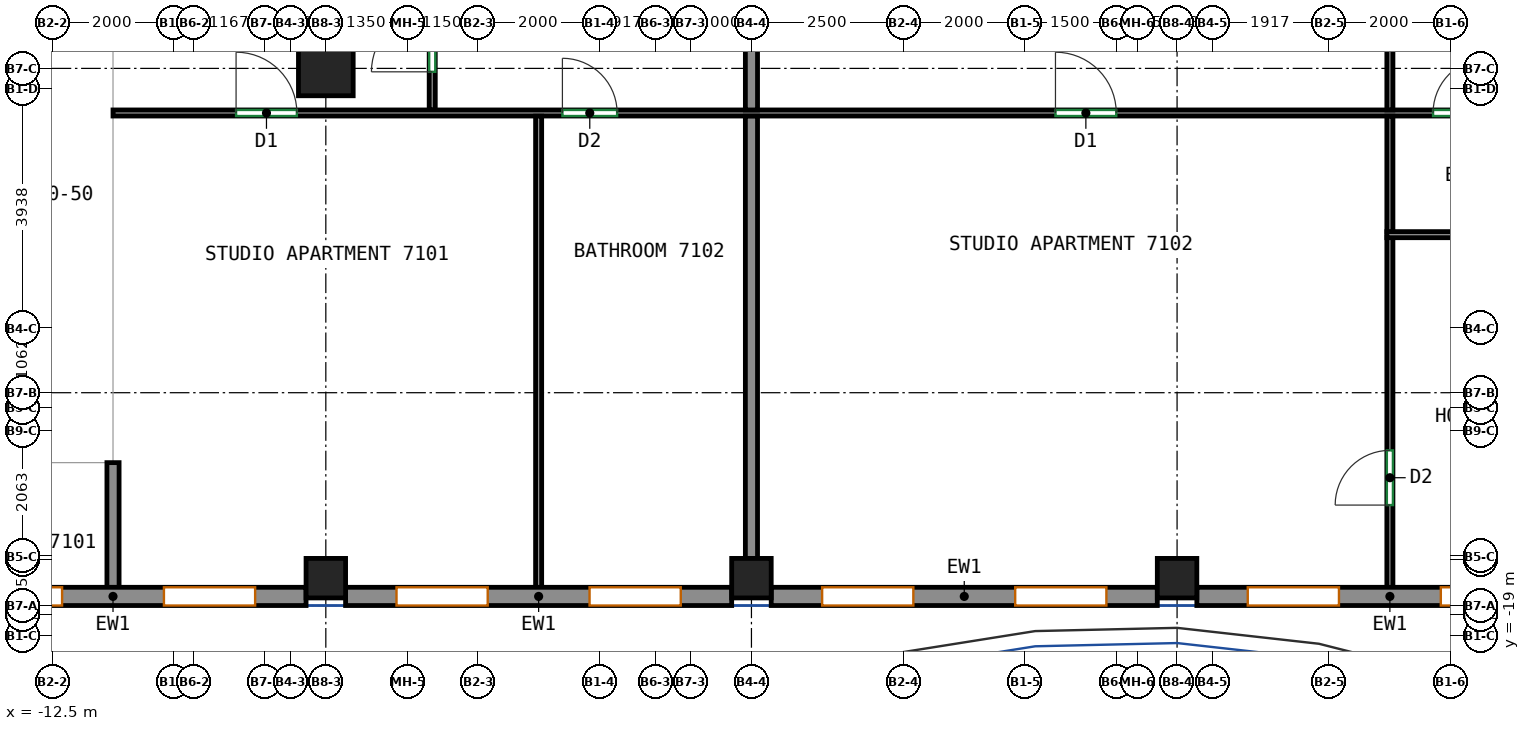
"""IFC4 building model, lengths in metres.
Left out: names, types, materials, properties, quantities, classifications, styles, units other than length and angle.
Written with IfcOpenShell. Run it as: python <this file> out.ifc"""

import sys

from ifc_helpers import new_model, si_unit, direction, frame, frame_2d, origin, origin_2d, place, context, subcontext, project, spatial, rectangle, extrude, source, transform, mapped, element, fill, save


model = new_model("IFC4")
c1 = context("Model", 3, precision=1e-05, world=origin(), true_north=direction((0.0, 1.0)))
c2 = subcontext(c1, "Body", "Model", "MODEL_VIEW")
j1 = project(units=[si_unit("LENGTHUNIT", "METRE"), si_unit("PLANEANGLEUNIT", "RADIAN")], contexts=[c1])
p1 = place(None, origin())
s1 = spatial("IfcSite", under=j1, at=p1, CompositionType="ELEMENT")
p2 = place(p1, origin())
s2 = spatial("IfcBuilding", under=s1, at=p2, CompositionType="ELEMENT")
p3 = place(p2, frame((0.0, 0.0, 287.4)))
s3 = spatial("IfcBuildingStorey", under=s2, at=p3, CompositionType="ELEMENT", Elevation=287.4)
m1 = source(origin(), c2, "Body", "SweptSolid", [
    extrude(rectangle(XDim=0.65, YDim=0.65, at=origin_2d()), origin(), (0.0, 0.0, 1.0), 3.0),
])
p4 = place(p3, frame((-8.0, -18.05, 0.0), z_axis=(0.0, 0.0, 1.0), x_axis=(1.0, 0.0, 0.0)))
e1 = element("IfcColumn", 1, at=p4, inside=s3, PredefinedType="COLUMN", context=c2, shape_type="MappedRepresentation", body=[
    mapped(m1, transform((0.0, 0.0, 0.0))),
])
m2 = source(origin(), c2, "Body", "SweptSolid", [
    extrude(rectangle(XDim=0.9, YDim=0.9, at=origin_2d()), origin(), (0.0, 0.0, 1.0), 3.0),
])
p5 = place(p3, frame((-8.0, -9.667, 0.0), z_axis=(0.0, 0.0, 1.0), x_axis=(1.0, 0.0, 0.0)))
e2 = element("IfcColumn", 2, at=p5, inside=s3, PredefinedType="COLUMN", context=c2, shape_type="MappedRepresentation", body=[
    mapped(m2, transform((0.0, 0.0, 0.0))),
])
for number, where, z_axis, x_axis in (
    (3, (-1.0, -18.05, 0.0), (0.0, 0.0, 1.0), (1.0, 0.0, 0.0)),
    (4, (6.0, -18.05, 0.0), (0.0, 0.0, 1.0), (1.0, 0.0, 0.0)),
):
    element("IfcColumn", number, at=place(p3, frame(where, z_axis=z_axis, x_axis=x_axis)), inside=s3, PredefinedType="COLUMN", context=c2, shape_type="MappedRepresentation", body=[
        mapped(m1, transform((0.0, 0.0, 0.0))),
    ])
m3 = source(origin(), c2, "Body", "SweptSolid", [
    extrude(rectangle(XDim=6.35, YDim=0.3, at=frame_2d((3.175, 0.0))), origin(), (0.0, 0.0, 1.0), 3.0),
])
p6 = place(p3, frame((-14.675, -18.35, 0.0), z_axis=(0.0, 0.0, 1.0), x_axis=(1.0, 0.0, 0.0)))
e5 = element("IfcWall", 5, at=p6, inside=s3, PredefinedType="SOLIDWALL", context=c2, shape_type="MappedRepresentation", body=[
    mapped(m3, transform((0.0, 0.0, 0.0))),
])
p7 = place(p6, frame((0.837, 0.0, 0.8)))
e6 = element("IfcOpeningElement", 6, at=p7, cuts=e5, PredefinedType="OPENING", context=c2, shape_type="SweptSolid", body=[
    extrude(rectangle(XDim=1.5, YDim=2.05, at=frame_2d((0.75, 1.025))), frame((0.0, 0.16, 0.0), z_axis=(0.0, -1.0, 0.0), x_axis=(1.0, 0.0, 0.0)), (0.0, 0.0, 1.0), 0.32),
])
p8 = place(p6, frame((4.012, 0.0, 0.8)))
e7 = element("IfcOpeningElement", 7, at=p8, cuts=e5, PredefinedType="OPENING", context=c2, shape_type="SweptSolid", body=[
    extrude(rectangle(XDim=1.5, YDim=2.05, at=frame_2d((0.75, 1.025))), frame((0.0, 0.16, 0.0), z_axis=(0.0, -1.0, 0.0), x_axis=(1.0, 0.0, 0.0)), (0.0, 0.0, 1.0), 0.32),
])
p9 = place(p3, frame((-7.675, -18.35, 0.0), z_axis=(0.0, 0.0, 1.0), x_axis=(1.0, 0.0, 0.0)))
e8 = element("IfcWall", 8, at=p9, inside=s3, PredefinedType="SOLIDWALL", context=c2, shape_type="MappedRepresentation", body=[
    mapped(m3, transform((0.0, 0.0, 0.0))),
])
p10 = place(p9, frame((0.837, 0.0, 0.8)))
e9 = element("IfcOpeningElement", 9, at=p10, cuts=e8, PredefinedType="OPENING", context=c2, shape_type="SweptSolid", body=[
    extrude(rectangle(XDim=1.5, YDim=2.05, at=frame_2d((0.75, 1.025))), frame((0.0, 0.16, 0.0), z_axis=(0.0, -1.0, 0.0), x_axis=(1.0, 0.0, 0.0)), (0.0, 0.0, 1.0), 0.32),
])
p11 = place(p9, frame((4.012, 0.0, 0.8)))
e10 = element("IfcOpeningElement", 10, at=p11, cuts=e8, PredefinedType="OPENING", context=c2, shape_type="SweptSolid", body=[
    extrude(rectangle(XDim=1.5, YDim=2.05, at=frame_2d((0.75, 1.025))), frame((0.0, 0.16, 0.0), z_axis=(0.0, -1.0, 0.0), x_axis=(1.0, 0.0, 0.0)), (0.0, 0.0, 1.0), 0.32),
])
p12 = place(p3, frame((-0.675, -18.35, 0.0), z_axis=(0.0, 0.0, 1.0), x_axis=(1.0, 0.0, 0.0)))
e11 = element("IfcWall", 11, at=p12, inside=s3, PredefinedType="SOLIDWALL", context=c2, shape_type="MappedRepresentation", body=[
    mapped(m3, transform((0.0, 0.0, 0.0))),
])
p13 = place(p12, frame((0.837, 0.0, 0.8)))
e12 = element("IfcOpeningElement", 12, at=p13, cuts=e11, PredefinedType="OPENING", context=c2, shape_type="SweptSolid", body=[
    extrude(rectangle(XDim=1.5, YDim=2.05, at=frame_2d((0.75, 1.025))), frame((0.0, 0.16, 0.0), z_axis=(0.0, -1.0, 0.0), x_axis=(1.0, 0.0, 0.0)), (0.0, 0.0, 1.0), 0.32),
])
p14 = place(p12, frame((4.012, 0.0, 0.8)))
e13 = element("IfcOpeningElement", 13, at=p14, cuts=e11, PredefinedType="OPENING", context=c2, shape_type="SweptSolid", body=[
    extrude(rectangle(XDim=1.5, YDim=2.05, at=frame_2d((0.75, 1.025))), frame((0.0, 0.16, 0.0), z_axis=(0.0, -1.0, 0.0), x_axis=(1.0, 0.0, 0.0)), (0.0, 0.0, 1.0), 0.32),
])
p15 = place(p3, frame((6.325, -18.35, 0.0), z_axis=(0.0, 0.0, 1.0), x_axis=(1.0, 0.0, 0.0)))
e14 = element("IfcWall", 14, at=p15, inside=s3, PredefinedType="SOLIDWALL", context=c2, shape_type="MappedRepresentation", body=[
    mapped(m3, transform((0.0, 0.0, 0.0))),
])
p16 = place(p15, frame((0.837, 0.0, 0.8)))
e15 = element("IfcOpeningElement", 15, at=p16, cuts=e14, PredefinedType="OPENING", context=c2, shape_type="SweptSolid", body=[
    extrude(rectangle(XDim=1.5, YDim=2.05, at=frame_2d((0.75, 1.025))), frame((0.0, 0.16, 0.0), z_axis=(0.0, -1.0, 0.0), x_axis=(1.0, 0.0, 0.0)), (0.0, 0.0, 1.0), 0.32),
])
p17 = place(p15, frame((4.012, 0.0, 0.8)))
e16 = element("IfcOpeningElement", 16, at=p17, cuts=e14, PredefinedType="OPENING", context=c2, shape_type="SweptSolid", body=[
    extrude(rectangle(XDim=1.5, YDim=2.05, at=frame_2d((0.75, 1.025))), frame((0.0, 0.16, 0.0), z_axis=(0.0, -1.0, 0.0), x_axis=(1.0, 0.0, 0.0)), (0.0, 0.0, 1.0), 0.32),
])
p18 = place(p3, frame((-11.5, -18.25, 0.0), z_axis=(0.0, 0.0, 1.0), x_axis=(0.0, 1.0, 0.0)))
e17 = element("IfcWall", 17, at=p18, inside=s3, PredefinedType="PARTITIONING", context=c2, shape_type="SweptSolid", body=[
    extrude(rectangle(XDim=2.1, YDim=0.2, at=frame_2d((1.05, 0.0))), origin(), (0.0, 0.0, 1.0), 3.0),
])
p19 = place(p3, frame((-6.25, -10.35, 0.0), z_axis=(0.0, 0.0, 1.0), x_axis=(0.0, 1.0, 0.0)))
e18 = element("IfcWall", 18, at=p19, inside=s3, PredefinedType="PARTITIONING", context=c2, shape_type="SweptSolid", body=[
    extrude(rectangle(XDim=2.573, YDim=0.1, at=frame_2d((1.287, 0.0))), origin(), (0.0, 0.0, 1.0), 3.0),
])
p20 = place(p19, frame((0.627, 0.0, 0.0)))
e19 = element("IfcOpeningElement", 19, at=p20, cuts=e18, PredefinedType="OPENING", context=c2, shape_type="SweptSolid", body=[
    extrude(rectangle(XDim=1.0, YDim=2.1, at=frame_2d((0.5, 1.05))), frame((0.0, 0.06, 0.0), z_axis=(0.0, -1.0, 0.0), x_axis=(1.0, 0.0, 0.0)), (0.0, 0.0, 1.0), 0.12),
])
p21 = place(p3, frame((-11.5, -10.4, 0.0), z_axis=(0.0, 0.0, 1.0), x_axis=(1.0, 0.0, 0.0)))
e20 = element("IfcWall", 20, at=p21, inside=s3, PredefinedType="PARTITIONING", context=c2, shape_type="SweptSolid", body=[
    extrude(rectangle(XDim=29.25, YDim=0.1, at=frame_2d((14.625, 0.0))), origin(), (0.0, 0.0, 1.0), 3.0),
])
p22 = place(p21, frame((2.024, 0.0, 0.0)))
e21 = element("IfcOpeningElement", 21, at=p22, cuts=e20, PredefinedType="OPENING", context=c2, shape_type="SweptSolid", body=[
    extrude(rectangle(XDim=1.0, YDim=2.1, at=frame_2d((0.5, 1.05))), frame((0.0, 0.06, 0.0), z_axis=(0.0, -1.0, 0.0), x_axis=(1.0, 0.0, 0.0)), (0.0, 0.0, 1.0), 0.12),
])
p23 = place(p21, frame((7.391, 0.0, 0.0)))
e22 = element("IfcOpeningElement", 22, at=p23, cuts=e20, PredefinedType="OPENING", context=c2, shape_type="SweptSolid", body=[
    extrude(rectangle(XDim=0.9, YDim=2.1, at=frame_2d((0.45, 1.05))), frame((0.0, 0.06, 0.0), z_axis=(0.0, -1.0, 0.0), x_axis=(1.0, 0.0, 0.0)), (0.0, 0.0, 1.0), 0.12),
])
p24 = place(p21, frame((15.5, 0.0, 0.0)))
e23 = element("IfcOpeningElement", 23, at=p24, cuts=e20, PredefinedType="OPENING", context=c2, shape_type="SweptSolid", body=[
    extrude(rectangle(XDim=1.0, YDim=2.1, at=frame_2d((0.5, 1.05))), frame((0.0, 0.06, 0.0), z_axis=(0.0, -1.0, 0.0), x_axis=(1.0, 0.0, 0.0)), (0.0, 0.0, 1.0), 0.12),
])
p25 = place(p21, frame((21.71, 0.0, 0.0)))
e24 = element("IfcOpeningElement", 24, at=p25, cuts=e20, PredefinedType="OPENING", context=c2, shape_type="SweptSolid", body=[
    extrude(rectangle(XDim=0.9, YDim=2.1, at=frame_2d((0.45, 1.05))), frame((0.0, 0.06, 0.0), z_axis=(0.0, -1.0, 0.0), x_axis=(1.0, 0.0, 0.0)), (0.0, 0.0, 1.0), 0.12),
])
p26 = place(p21, frame((26.444, 0.0, 0.0)))
e25 = element("IfcOpeningElement", 25, at=p26, cuts=e20, PredefinedType="OPENING", context=c2, shape_type="SweptSolid", body=[
    extrude(rectangle(XDim=0.9, YDim=2.1, at=frame_2d((0.45, 1.05))), frame((0.0, 0.06, 0.0), z_axis=(0.0, -1.0, 0.0), x_axis=(1.0, 0.0, 0.0)), (0.0, 0.0, 1.0), 0.12),
])
p27 = place(p3, frame((-1.0, -10.35, 0.0), z_axis=(0.0, 0.0, 1.0), x_axis=(0.0, 1.0, 0.0)))
e26 = element("IfcWall", 26, at=p27, inside=s3, PredefinedType="PARTITIONING", context=c2, shape_type="SweptSolid", body=[
    extrude(rectangle(XDim=2.573, YDim=0.2, at=frame_2d((1.287, 0.0))), origin(), (0.0, 0.0, 1.0), 3.0),
])
p28 = place(p3, frame((-4.5, -18.25, 0.0), z_axis=(0.0, 0.0, 1.0), x_axis=(0.0, 1.0, 0.0)))
e27 = element("IfcWall", 27, at=p28, inside=s3, PredefinedType="PARTITIONING", context=c2, shape_type="SweptSolid", body=[
    extrude(rectangle(XDim=7.798, YDim=0.1, at=frame_2d((3.899, 0.0))), origin(), (0.0, 0.0, 1.0), 3.0),
])
p29 = place(p3, frame((-1.0, -17.725, 0.0), z_axis=(0.0, 0.0, 1.0), x_axis=(0.0, 1.0, 0.0)))
e28 = element("IfcWall", 28, at=p29, inside=s3, PredefinedType="PARTITIONING", context=c2, shape_type="SweptSolid", body=[
    extrude(rectangle(XDim=7.273, YDim=0.2, at=frame_2d((3.637, 0.0))), origin(), (0.0, 0.0, 1.0), 3.0),
])
p30 = place(p3, frame((9.5, -10.35, 0.0), z_axis=(0.0, 0.0, 1.0), x_axis=(0.0, 1.0, 0.0)))
e29 = element("IfcWall", 29, at=p30, inside=s3, PredefinedType="PARTITIONING", context=c2, shape_type="SweptSolid", body=[
    extrude(rectangle(XDim=2.573, YDim=0.1, at=frame_2d((1.287, 0.0))), origin(), (0.0, 0.0, 1.0), 3.0),
])
p31 = place(p30, frame((1.16, 0.0, 0.0)))
e30 = element("IfcOpeningElement", 30, at=p31, cuts=e29, PredefinedType="OPENING", context=c2, shape_type="SweptSolid", body=[
    extrude(rectangle(XDim=1.0, YDim=2.1, at=frame_2d((0.5, 1.05))), frame((0.0, 0.06, 0.0), z_axis=(0.0, -1.0, 0.0), x_axis=(1.0, 0.0, 0.0)), (0.0, 0.0, 1.0), 0.12),
])
p32 = place(p3, frame((9.5, -18.25, 0.0), z_axis=(0.0, 0.0, 1.0), x_axis=(0.0, 1.0, 0.0)))
e31 = element("IfcWall", 31, at=p32, inside=s3, PredefinedType="PARTITIONING", context=c2, shape_type="SweptSolid", body=[
    extrude(rectangle(XDim=5.809, YDim=0.1, at=frame_2d((2.905, 0.0))), origin(), (0.0, 0.0, 1.0), 3.0),
])
p33 = place(p32, frame((1.402, 0.0, 0.0)))
e32 = element("IfcOpeningElement", 32, at=p33, cuts=e31, PredefinedType="OPENING", context=c2, shape_type="SweptSolid", body=[
    extrude(rectangle(XDim=0.9, YDim=2.1, at=frame_2d((0.45, 1.05))), frame((0.0, 0.06, 0.0), z_axis=(0.0, -1.0, 0.0), x_axis=(1.0, 0.0, 0.0)), (0.0, 0.0, 1.0), 0.12),
])
p34 = place(p3, frame((9.5, -12.36, 0.0), z_axis=(0.0, 0.0, 1.0), x_axis=(0.0, 1.0, 0.0)))
e33 = element("IfcWall", 33, at=p34, inside=s3, PredefinedType="PARTITIONING", context=c2, shape_type="SweptSolid", body=[
    extrude(rectangle(XDim=1.908, YDim=0.1, at=frame_2d((0.954, 0.0))), origin(), (0.0, 0.0, 1.0), 3.0),
])
p35 = place(p3, frame((13.8, -12.401, 0.0), z_axis=(0.0, 0.0, 1.0), x_axis=(-1.0, 0.0, 0.0)))
e34 = element("IfcWall", 34, at=p35, inside=s3, PredefinedType="PARTITIONING", context=c2, shape_type="SweptSolid", body=[
    extrude(rectangle(XDim=4.35, YDim=0.1, at=frame_2d((2.175, 0.0))), origin(), (0.0, 0.0, 1.0), 3.0),
])
p36 = place(p7, origin())
e35 = element("IfcWindow", 35, at=p36, inside=s3, PartitioningType="SINGLE_PANEL", PredefinedType="WINDOW", context=c2, shape_type="SweptSolid", body=[
    extrude(rectangle(XDim=1.5, YDim=2.05, at=frame_2d((0.75, 1.025))), frame((0.0, 0.03, 0.0), z_axis=(0.0, -1.0, 0.0), x_axis=(1.0, 0.0, 0.0)), (0.0, 0.0, 1.0), 0.06),
])
fill(e6, e35)
p37 = place(p8, origin())
e36 = element("IfcWindow", 36, at=p37, inside=s3, PartitioningType="SINGLE_PANEL", PredefinedType="WINDOW", context=c2, shape_type="SweptSolid", body=[
    extrude(rectangle(XDim=1.5, YDim=2.05, at=frame_2d((0.75, 1.025))), frame((0.0, 0.03, 0.0), z_axis=(0.0, -1.0, 0.0), x_axis=(1.0, 0.0, 0.0)), (0.0, 0.0, 1.0), 0.06),
])
fill(e7, e36)
p38 = place(p10, origin())
e37 = element("IfcWindow", 37, at=p38, inside=s3, PartitioningType="SINGLE_PANEL", PredefinedType="WINDOW", context=c2, shape_type="SweptSolid", body=[
    extrude(rectangle(XDim=1.5, YDim=2.05, at=frame_2d((0.75, 1.025))), frame((0.0, 0.03, 0.0), z_axis=(0.0, -1.0, 0.0), x_axis=(1.0, 0.0, 0.0)), (0.0, 0.0, 1.0), 0.06),
])
fill(e9, e37)
p39 = place(p11, origin())
e38 = element("IfcWindow", 38, at=p39, inside=s3, PartitioningType="SINGLE_PANEL", PredefinedType="WINDOW", context=c2, shape_type="SweptSolid", body=[
    extrude(rectangle(XDim=1.5, YDim=2.05, at=frame_2d((0.75, 1.025))), frame((0.0, 0.03, 0.0), z_axis=(0.0, -1.0, 0.0), x_axis=(1.0, 0.0, 0.0)), (0.0, 0.0, 1.0), 0.06),
])
fill(e10, e38)
p40 = place(p13, origin())
e39 = element("IfcWindow", 39, at=p40, inside=s3, PartitioningType="SINGLE_PANEL", PredefinedType="WINDOW", context=c2, shape_type="SweptSolid", body=[
    extrude(rectangle(XDim=1.5, YDim=2.05, at=frame_2d((0.75, 1.025))), frame((0.0, 0.03, 0.0), z_axis=(0.0, -1.0, 0.0), x_axis=(1.0, 0.0, 0.0)), (0.0, 0.0, 1.0), 0.06),
])
fill(e12, e39)
p41 = place(p14, origin())
e40 = element("IfcWindow", 40, at=p41, inside=s3, PartitioningType="SINGLE_PANEL", PredefinedType="WINDOW", context=c2, shape_type="SweptSolid", body=[
    extrude(rectangle(XDim=1.5, YDim=2.05, at=frame_2d((0.75, 1.025))), frame((0.0, 0.03, 0.0), z_axis=(0.0, -1.0, 0.0), x_axis=(1.0, 0.0, 0.0)), (0.0, 0.0, 1.0), 0.06),
])
fill(e13, e40)
p42 = place(p16, origin())
e41 = element("IfcWindow", 41, at=p42, inside=s3, PartitioningType="SINGLE_PANEL", PredefinedType="WINDOW", context=c2, shape_type="SweptSolid", body=[
    extrude(rectangle(XDim=1.5, YDim=2.05, at=frame_2d((0.75, 1.025))), frame((0.0, 0.03, 0.0), z_axis=(0.0, -1.0, 0.0), x_axis=(1.0, 0.0, 0.0)), (0.0, 0.0, 1.0), 0.06),
])
fill(e15, e41)
p43 = place(p17, origin())
e42 = element("IfcWindow", 42, at=p43, inside=s3, PartitioningType="SINGLE_PANEL", PredefinedType="WINDOW", context=c2, shape_type="SweptSolid", body=[
    extrude(rectangle(XDim=1.5, YDim=2.05, at=frame_2d((0.75, 1.025))), frame((0.0, 0.03, 0.0), z_axis=(0.0, -1.0, 0.0), x_axis=(1.0, 0.0, 0.0)), (0.0, 0.0, 1.0), 0.06),
])
fill(e16, e42)
p44 = place(p33, origin())
e43 = element("IfcDoor", 43, at=p44, inside=s3, OperationType="SINGLE_SWING_LEFT", PredefinedType="DOOR", context=c2, shape_type="SweptSolid", body=[
    extrude(rectangle(XDim=0.9, YDim=2.1, at=frame_2d((0.45, 1.05))), frame((0.0, 0.025, 0.0), z_axis=(0.0, -1.0, 0.0), x_axis=(1.0, 0.0, 0.0)), (0.0, 0.0, 1.0), 0.05),
])
fill(e32, e43)
p45 = place(p22, origin())
e44 = element("IfcDoor", 44, at=p45, inside=s3, OperationType="SINGLE_SWING_LEFT", PredefinedType="DOOR", context=c2, shape_type="SweptSolid", body=[
    extrude(rectangle(XDim=1.0, YDim=2.1, at=frame_2d((0.5, 1.05))), frame((0.0, 0.025, 0.0), z_axis=(0.0, -1.0, 0.0), x_axis=(1.0, 0.0, 0.0)), (0.0, 0.0, 1.0), 0.05),
])
fill(e21, e44)
p46 = place(p23, origin())
e45 = element("IfcDoor", 45, at=p46, inside=s3, OperationType="SINGLE_SWING_LEFT", PredefinedType="DOOR", context=c2, shape_type="SweptSolid", body=[
    extrude(rectangle(XDim=0.9, YDim=2.1, at=frame_2d((0.45, 1.05))), frame((0.0, 0.025, 0.0), z_axis=(0.0, -1.0, 0.0), x_axis=(1.0, 0.0, 0.0)), (0.0, 0.0, 1.0), 0.05),
])
fill(e22, e45)
p47 = place(p24, origin())
e46 = element("IfcDoor", 46, at=p47, inside=s3, OperationType="SINGLE_SWING_LEFT", PredefinedType="DOOR", context=c2, shape_type="SweptSolid", body=[
    extrude(rectangle(XDim=1.0, YDim=2.1, at=frame_2d((0.5, 1.05))), frame((0.0, 0.025, 0.0), z_axis=(0.0, -1.0, 0.0), x_axis=(1.0, 0.0, 0.0)), (0.0, 0.0, 1.0), 0.05),
])
fill(e23, e46)
p48 = place(p25, origin())
e47 = element("IfcDoor", 47, at=p48, inside=s3, OperationType="SINGLE_SWING_RIGHT", PredefinedType="DOOR", context=c2, shape_type="SweptSolid", body=[
    extrude(rectangle(XDim=0.9, YDim=2.1, at=frame_2d((0.45, 1.05))), frame((0.0, 0.025, 0.0), z_axis=(0.0, -1.0, 0.0), x_axis=(1.0, 0.0, 0.0)), (0.0, 0.0, 1.0), 0.05),
])
fill(e24, e47)
p49 = place(p20, origin())
e48 = element("IfcDoor", 48, at=p49, inside=s3, OperationType="SINGLE_SWING_LEFT", PredefinedType="DOOR", context=c2, shape_type="SweptSolid", body=[
    extrude(rectangle(XDim=1.0, YDim=2.1, at=frame_2d((0.5, 1.05))), frame((0.0, 0.025, 0.0), z_axis=(0.0, -1.0, 0.0), x_axis=(1.0, 0.0, 0.0)), (0.0, 0.0, 1.0), 0.05),
])
fill(e19, e48)
save(model, sys.argv[1])
